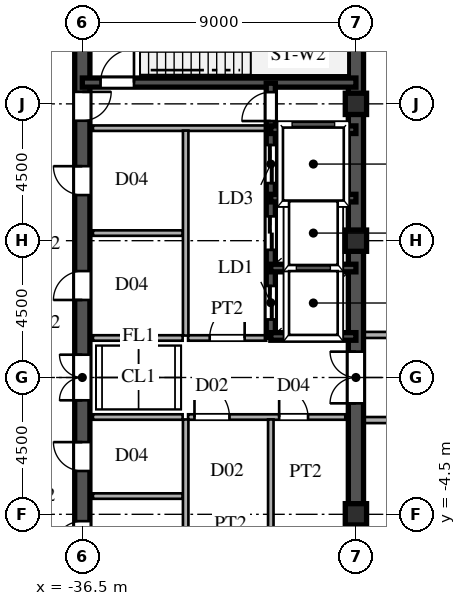
"""IFC4 building model, lengths in metres.
Left out: names, types, materials, properties, quantities, classifications, styles, units other than length and angle.
Written with IfcOpenShell. Run it as: python <this file> out.ifc"""

import sys

from ifc_helpers import new_model, si_unit, direction, frame, frame_2d, origin, origin_2d, place, context, subcontext, project, spatial, rectangle, hollow_rectangle, extrude, source, transform, mapped, element, fill, save


model = new_model("IFC4")
c1 = context("Model", 3, precision=1e-05, world=origin(), true_north=direction((0.0, 1.0)))
c2 = subcontext(c1, "Body", "Model", "MODEL_VIEW")
j1 = project(units=[si_unit("LENGTHUNIT", "METRE"), si_unit("PLANEANGLEUNIT", "RADIAN")], contexts=[c1])
p1 = place(None, origin())
s1 = spatial("IfcSite", under=j1, at=p1, CompositionType="ELEMENT")
p2 = place(p1, origin())
s2 = spatial("IfcBuilding", under=s1, at=p2, CompositionType="ELEMENT")
p3 = place(p2, frame((0.0, 0.0, 269.4)))
s3 = spatial("IfcBuildingStorey", under=s2, at=p3, CompositionType="ELEMENT", Elevation=269.4)
m1 = source(origin(), c2, "Body", "SweptSolid", [
    extrude(hollow_rectangle(XDim=0.7, YDim=0.7, WallThickness=0.03, at=origin_2d()), origin(), (0.0, 0.0, 1.0), 4.8),
])
for number, where, z_axis, x_axis in (
    (1, (-27.5, -4.5, 0.0), (0.0, 0.0, 1.0), (1.0, 0.0, 0.0)),
    (2, (-27.5, 4.5, 0.0), (0.0, 0.0, 1.0), (1.0, 0.0, 0.0)),
    (3, (-27.5, 9.0, 0.0), (0.0, 0.0, 1.0), (1.0, 0.0, 0.0)),
):
    element("IfcColumn", number, at=place(p3, frame(where, z_axis=z_axis, x_axis=x_axis)), inside=s3, PredefinedType="COLUMN", context=c2, shape_type="MappedRepresentation", body=[
        mapped(m1, transform((0.0, 0.0, 0.0), scale=1.0)),
    ])
for number, where, z_axis, x_axis in (
    (4, (-27.5, -13.5, 0.0), (0.0, 0.0, 1.0), (0.0, 1.0, 0.0)),
    (5, (-27.5, 1.3, 0.0), (0.0, 0.0, 1.0), (0.0, 1.0, 0.0)),
):
    element("IfcWall", number, at=place(p3, frame(where, z_axis=z_axis, x_axis=x_axis)), inside=s3, PredefinedType="SHEAR", context=c2, shape_type="SweptSolid", body=[
        extrude(rectangle(XDim=12.2, YDim=0.5, at=frame_2d((6.1, 0.0))), origin(), (0.0, 0.0, 1.0), 4.54),
    ])
p4 = place(p3, frame((-27.5, -1.3, 0.0), z_axis=(0.0, 0.0, 1.0), x_axis=(0.0, 1.0, 0.0)))
e6 = element("IfcWall", 6, at=p4, inside=s3, PredefinedType="SHEAR", context=c2, shape_type="SweptSolid", body=[
    extrude(rectangle(XDim=2.6, YDim=0.5, at=frame_2d((1.3, 0.0))), origin(), (0.0, 0.0, 1.0), 4.54),
])
p5 = place(p4, frame((0.45, 0.0, 0.0)))
e7 = element("IfcOpeningElement", 7, at=p5, cuts=e6, PredefinedType="OPENING", context=c2, shape_type="SweptSolid", body=[
    extrude(rectangle(XDim=1.7, YDim=2.35, at=frame_2d((0.85, 1.175))), frame((0.0, 0.26, 0.0), z_axis=(0.0, -1.0, 0.0), x_axis=(1.0, 0.0, 0.0)), (0.0, 0.0, 1.0), 0.52),
])
p6 = place(p3, frame((-36.5, -1.3, 0.0), z_axis=(0.0, 0.0, 1.0), x_axis=(0.0, 1.0, 0.0)))
e8 = element("IfcWall", 8, at=p6, inside=s3, PredefinedType="SHEAR", context=c2, shape_type="SweptSolid", body=[
    extrude(rectangle(XDim=2.6, YDim=0.5, at=frame_2d((1.3, 0.0))), origin(), (0.0, 0.0, 1.0), 4.54),
])
p7 = place(p6, frame((0.55, 0.0, 0.0)))
e9 = element("IfcOpeningElement", 9, at=p7, cuts=e8, PredefinedType="OPENING", context=c2, shape_type="SweptSolid", body=[
    extrude(rectangle(XDim=1.5, YDim=2.3, at=frame_2d((0.75, 1.15))), frame((0.0, 0.26, 0.0), z_axis=(0.0, -1.0, 0.0), x_axis=(1.0, 0.0, 0.0)), (0.0, 0.0, 1.0), 0.52),
])
p8 = place(p3, frame((-36.5, 8.2, 0.0), z_axis=(0.0, 0.0, 1.0), x_axis=(0.0, 1.0, 0.0)))
e10 = element("IfcWall", 10, at=p8, inside=s3, PredefinedType="SHEAR", context=c2, shape_type="SweptSolid", body=[
    extrude(rectangle(XDim=5.45, YDim=0.5, at=frame_2d((2.725, 0.0))), origin(), (0.0, 0.0, 1.0), 4.54),
])
p9 = place(p8, frame((0.245, 0.0, 0.0)))
e11 = element("IfcOpeningElement", 11, at=p9, cuts=e10, PredefinedType="OPENING", context=c2, shape_type="SweptSolid", body=[
    extrude(rectangle(XDim=0.95, YDim=2.15, at=frame_2d((0.475, 1.075))), frame((0.0, 0.26, 0.0), z_axis=(0.0, -1.0, 0.0), x_axis=(1.0, 0.0, 0.0)), (0.0, 0.0, 1.0), 0.52),
])
p10 = place(p3, frame((-36.5, -6.5, 0.0), z_axis=(0.0, 0.0, 1.0), x_axis=(0.0, 1.0, 0.0)))
e12 = element("IfcWall", 12, at=p10, inside=s3, PredefinedType="SHEAR", context=c2, shape_type="SweptSolid", body=[
    extrude(rectangle(XDim=2.6, YDim=0.5, at=frame_2d((1.3, 0.0))), origin(), (0.0, 0.0, 1.0), 4.54),
])
p11 = place(p10, frame((0.825, 0.0, 0.0)))
e13 = element("IfcOpeningElement", 13, at=p11, cuts=e12, PredefinedType="OPENING", context=c2, shape_type="SweptSolid", body=[
    extrude(rectangle(XDim=0.95, YDim=2.15, at=frame_2d((0.475, 1.075))), frame((0.0, 0.26, 0.0), z_axis=(0.0, -1.0, 0.0), x_axis=(1.0, 0.0, 0.0)), (0.0, 0.0, 1.0), 0.52),
])
p12 = place(p3, frame((-36.5, -3.9, 0.0), z_axis=(0.0, 0.0, 1.0), x_axis=(0.0, 1.0, 0.0)))
e14 = element("IfcWall", 14, at=p12, inside=s3, PredefinedType="SHEAR", context=c2, shape_type="SweptSolid", body=[
    extrude(rectangle(XDim=2.6, YDim=0.5, at=frame_2d((1.3, 0.0))), origin(), (0.0, 0.0, 1.0), 4.54),
])
p13 = place(p12, frame((0.825, 0.0, 0.0)))
e15 = element("IfcOpeningElement", 15, at=p13, cuts=e14, PredefinedType="OPENING", context=c2, shape_type="SweptSolid", body=[
    extrude(rectangle(XDim=0.95, YDim=2.15, at=frame_2d((0.475, 1.075))), frame((0.0, 0.26, 0.0), z_axis=(0.0, -1.0, 0.0), x_axis=(1.0, 0.0, 0.0)), (0.0, 0.0, 1.0), 0.52),
])
p14 = place(p3, frame((-36.5, 1.3, 0.0), z_axis=(0.0, 0.0, 1.0), x_axis=(0.0, 1.0, 0.0)))
e16 = element("IfcWall", 16, at=p14, inside=s3, PredefinedType="SHEAR", context=c2, shape_type="SweptSolid", body=[
    extrude(rectangle(XDim=3.45, YDim=0.5, at=frame_2d((1.725, 0.0))), origin(), (0.0, 0.0, 1.0), 4.54),
])
p15 = place(p14, frame((1.25, 0.0, 0.0)))
e17 = element("IfcOpeningElement", 17, at=p15, cuts=e16, PredefinedType="OPENING", context=c2, shape_type="SweptSolid", body=[
    extrude(rectangle(XDim=0.95, YDim=2.15, at=frame_2d((0.475, 1.075))), frame((0.0, 0.26, 0.0), z_axis=(0.0, -1.0, 0.0), x_axis=(1.0, 0.0, 0.0)), (0.0, 0.0, 1.0), 0.52),
])
p16 = place(p3, frame((-36.5, 4.75, 0.0), z_axis=(0.0, 0.0, 1.0), x_axis=(0.0, 1.0, 0.0)))
e18 = element("IfcWall", 18, at=p16, inside=s3, PredefinedType="SHEAR", context=c2, shape_type="SweptSolid", body=[
    extrude(rectangle(XDim=3.45, YDim=0.5, at=frame_2d((1.725, 0.0))), origin(), (0.0, 0.0, 1.0), 4.54),
])
p17 = place(p16, frame((1.25, 0.0, 0.0)))
e19 = element("IfcOpeningElement", 19, at=p17, cuts=e18, PredefinedType="OPENING", context=c2, shape_type="SweptSolid", body=[
    extrude(rectangle(XDim=0.95, YDim=2.15, at=frame_2d((0.475, 1.075))), frame((0.0, 0.26, 0.0), z_axis=(0.0, -1.0, 0.0), x_axis=(1.0, 0.0, 0.0)), (0.0, 0.0, 1.0), 0.52),
])
p18 = place(p3, frame((-36.5, 9.7, 0.0), z_axis=(0.0, 0.0, 1.0), x_axis=(1.0, 0.0, 0.0)))
e20 = element("IfcWall", 20, at=p18, inside=s3, PredefinedType="SHEAR", context=c2, shape_type="SweptSolid", body=[
    extrude(rectangle(XDim=9.0, YDim=0.3, at=frame_2d((4.5, 0.0))), origin(), (0.0, 0.0, 1.0), 4.54),
])
p19 = place(p18, frame((0.6, 0.0, 0.0)))
e21 = element("IfcOpeningElement", 21, at=p19, cuts=e20, PredefinedType="OPENING", context=c2, shape_type="SweptSolid", body=[
    extrude(rectangle(XDim=1.1, YDim=2.2, at=frame_2d((0.55, 1.1))), frame((0.0, 0.16, 0.0), z_axis=(0.0, -1.0, 0.0), x_axis=(1.0, 0.0, 0.0)), (0.0, 0.0, 1.0), 0.32),
])
for number, where, z_axis, x_axis in (
    (22, (-30.3, 1.35, 0.0), (0.0, 0.0, 1.0), (1.0, 0.0, 0.0)),
    (23, (-30.3, 3.6, 0.0), (0.0, 0.0, 1.0), (1.0, 0.0, 0.0)),
    (24, (-30.3, 5.9, 0.0), (0.0, 0.0, 1.0), (1.0, 0.0, 0.0)),
    (25, (-30.3, 8.15, 0.0), (0.0, 0.0, 1.0), (1.0, 0.0, 0.0)),
):
    element("IfcWall", number, at=place(p3, frame(where, z_axis=z_axis, x_axis=x_axis)), inside=s3, PredefinedType="SHEAR", context=c2, shape_type="SweptSolid", body=[
        extrude(rectangle(XDim=2.8, YDim=0.25, at=frame_2d((1.4, 0.0))), origin(), (0.0, 0.0, 1.0), 4.54),
    ])
p20 = place(p3, frame((-30.3, 1.32, 0.0), z_axis=(0.0, 0.0, 1.0), x_axis=(0.0, 1.0, 0.0)))
e26 = element("IfcWall", 26, at=p20, inside=s3, PredefinedType="SHEAR", context=c2, shape_type="SweptSolid", body=[
    extrude(rectangle(XDim=2.28, YDim=0.3, at=frame_2d((1.14, 0.0))), origin(), (0.0, 0.0, 1.0), 4.54),
])
p21 = place(p20, frame((0.59, 0.0, 0.0)))
e27 = element("IfcOpeningElement", 27, at=p21, cuts=e26, PredefinedType="OPENING", context=c2, shape_type="SweptSolid", body=[
    extrude(rectangle(XDim=1.1, YDim=2.2, at=frame_2d((0.55, 1.1))), frame((0.0, 0.16, 0.0), z_axis=(0.0, -1.0, 0.0), x_axis=(1.0, 0.0, 0.0)), (0.0, 0.0, 1.0), 0.32),
])
p22 = place(p3, frame((-30.3, 3.6, 0.0), z_axis=(0.0, 0.0, 1.0), x_axis=(0.0, 1.0, 0.0)))
e28 = element("IfcWall", 28, at=p22, inside=s3, PredefinedType="SHEAR", context=c2, shape_type="SweptSolid", body=[
    extrude(rectangle(XDim=2.3, YDim=0.3, at=frame_2d((1.15, 0.0))), origin(), (0.0, 0.0, 1.0), 4.54),
])
p23 = place(p22, frame((0.6, 0.0, 0.0)))
e29 = element("IfcOpeningElement", 29, at=p23, cuts=e28, PredefinedType="OPENING", context=c2, shape_type="SweptSolid", body=[
    extrude(rectangle(XDim=1.1, YDim=2.2, at=frame_2d((0.55, 1.1))), frame((0.0, 0.16, 0.0), z_axis=(0.0, -1.0, 0.0), x_axis=(1.0, 0.0, 0.0)), (0.0, 0.0, 1.0), 0.32),
])
p24 = place(p3, frame((-30.3, 5.9, 0.0), z_axis=(0.0, 0.0, 1.0), x_axis=(0.0, 1.0, 0.0)))
e30 = element("IfcWall", 30, at=p24, inside=s3, PredefinedType="SHEAR", context=c2, shape_type="SweptSolid", body=[
    extrude(rectangle(XDim=2.25, YDim=0.3, at=frame_2d((1.125, 0.0))), origin(), (0.0, 0.0, 1.0), 4.54),
])
p25 = place(p24, frame((0.495, 0.0, 0.0)))
e31 = element("IfcOpeningElement", 31, at=p25, cuts=e30, PredefinedType="OPENING", context=c2, shape_type="SweptSolid", body=[
    extrude(rectangle(XDim=1.25, YDim=2.3, at=frame_2d((0.625, 1.15))), frame((0.0, 0.16, 0.0), z_axis=(0.0, -1.0, 0.0), x_axis=(1.0, 0.0, 0.0)), (0.0, 0.0, 1.0), 0.32),
])
p26 = place(p3, frame((-30.3, 8.15, 0.0), z_axis=(0.0, 0.0, 1.0), x_axis=(0.0, 1.0, 0.0)))
e32 = element("IfcWall", 32, at=p26, inside=s3, PredefinedType="SHEAR", context=c2, shape_type="SweptSolid", body=[
    extrude(rectangle(XDim=1.53, YDim=0.3, at=frame_2d((0.765, 0.0))), origin(), (0.0, 0.0, 1.0), 4.54),
])
p27 = place(p26, frame((0.285, 0.0, 0.0)))
e33 = element("IfcOpeningElement", 33, at=p27, cuts=e32, PredefinedType="OPENING", context=c2, shape_type="SweptSolid", body=[
    extrude(rectangle(XDim=0.95, YDim=2.15, at=frame_2d((0.475, 1.075))), frame((0.0, 0.16, 0.0), z_axis=(0.0, -1.0, 0.0), x_axis=(1.0, 0.0, 0.0)), (0.0, 0.0, 1.0), 0.32),
])
p28 = place(p3, frame((-36.15, 8.2, 0.0), z_axis=(0.0, 0.0, 1.0), x_axis=(1.0, 0.0, 0.0)))
e34 = element("IfcWall", 34, at=p28, inside=s3, PredefinedType="PARTITIONING", context=c2, shape_type="SweptSolid", body=[
    extrude(rectangle(XDim=5.7, YDim=0.18, at=frame_2d((2.85, 0.0))), origin(), (0.0, 0.0, 1.0), 4.54),
])
p29 = place(p3, frame((-33.1, -6.42, 0.0), z_axis=(0.0, 0.0, 1.0), x_axis=(0.0, 1.0, 0.0)))
e35 = element("IfcWall", 35, at=p29, inside=s3, PredefinedType="PARTITIONING", context=c2, shape_type="SweptSolid", body=[
    extrude(rectangle(XDim=5.04, YDim=0.18, at=frame_2d((2.52, 0.0))), origin(), (0.0, 0.0, 1.0), 4.54),
])
p30 = place(p3, frame((-33.1, 1.38, 0.0), z_axis=(0.0, 0.0, 1.0), x_axis=(0.0, 1.0, 0.0)))
e36 = element("IfcWall", 36, at=p30, inside=s3, PredefinedType="PARTITIONING", context=c2, shape_type="SweptSolid", body=[
    extrude(rectangle(XDim=6.74, YDim=0.18, at=frame_2d((3.37, 0.0))), origin(), (0.0, 0.0, 1.0), 4.54),
])
p31 = place(p3, frame((-30.3, -1.3, 0.0), z_axis=(0.0, 0.0, 1.0), x_axis=(1.0, 0.0, 0.0)))
e37 = element("IfcWall", 37, at=p31, inside=s3, PredefinedType="PARTITIONING", context=c2, shape_type="SweptSolid", body=[
    extrude(rectangle(XDim=2.45, YDim=0.18, at=frame_2d((1.225, 0.0))), origin(), (0.0, 0.0, 1.0), 4.54),
])
p32 = place(p31, frame((0.275, 0.0, 0.0)))
e38 = element("IfcOpeningElement", 38, at=p32, cuts=e37, PredefinedType="OPENING", context=c2, shape_type="SweptSolid", body=[
    extrude(rectangle(XDim=0.95, YDim=2.15, at=frame_2d((0.475, 1.075))), frame((0.0, 0.1, 0.0), z_axis=(0.0, -1.0, 0.0), x_axis=(1.0, 0.0, 0.0)), (0.0, 0.0, 1.0), 0.2),
])
p33 = place(p3, frame((-33.02, -1.3, 0.0), z_axis=(0.0, 0.0, 1.0), x_axis=(1.0, 0.0, 0.0)))
e39 = element("IfcWall", 39, at=p33, inside=s3, PredefinedType="PARTITIONING", context=c2, shape_type="SweptSolid", body=[
    extrude(rectangle(XDim=2.72, YDim=0.18, at=frame_2d((1.36, 0.0))), origin(), (0.0, 0.0, 1.0), 4.54),
])
p34 = place(p33, frame((0.21, 0.0, 0.0)))
e40 = element("IfcOpeningElement", 40, at=p34, cuts=e39, PredefinedType="OPENING", context=c2, shape_type="SweptSolid", body=[
    extrude(rectangle(XDim=1.15, YDim=2.2, at=frame_2d((0.575, 1.1))), frame((0.0, 0.1, 0.0), z_axis=(0.0, -1.0, 0.0), x_axis=(1.0, 0.0, 0.0)), (0.0, 0.0, 1.0), 0.2),
])
p35 = place(p3, frame((-30.3, -7.12, 0.0), z_axis=(0.0, 0.0, 1.0), x_axis=(0.0, 1.0, 0.0)))
e41 = element("IfcWall", 41, at=p35, inside=s3, PredefinedType="PARTITIONING", context=c2, shape_type="SweptSolid", body=[
    extrude(rectangle(XDim=5.74, YDim=0.18, at=frame_2d((2.87, 0.0))), origin(), (0.0, 0.0, 1.0), 4.54),
])
p36 = place(p3, frame((-33.02, 1.3, 0.0), z_axis=(0.0, 0.0, 1.0), x_axis=(1.0, 0.0, 0.0)))
e42 = element("IfcWall", 42, at=p36, inside=s3, PredefinedType="PARTITIONING", context=c2, shape_type="SweptSolid", body=[
    extrude(rectangle(XDim=2.57, YDim=0.18, at=frame_2d((1.285, 0.0))), origin(), (0.0, 0.0, 1.0), 4.54),
])
p37 = place(p36, frame((0.71, 0.0, 0.0)))
e43 = element("IfcOpeningElement", 43, at=p37, cuts=e42, PredefinedType="OPENING", context=c2, shape_type="SweptSolid", body=[
    extrude(rectangle(XDim=1.15, YDim=2.2, at=frame_2d((0.575, 1.1))), frame((0.0, 0.1, 0.0), z_axis=(0.0, -1.0, 0.0), x_axis=(1.0, 0.0, 0.0)), (0.0, 0.0, 1.0), 0.2),
])
for number, where, z_axis, x_axis in (
    (44, (-36.15, -1.3, 0.0), (0.0, 0.0, 1.0), (1.0, 0.0, 0.0)),
    (45, (-36.15, 1.3, 0.0), (0.0, 0.0, 1.0), (1.0, 0.0, 0.0)),
    (46, (-36.15, -3.9, 0.0), (0.0, 0.0, 1.0), (1.0, 0.0, 0.0)),
    (47, (-36.15, 4.75, 0.0), (0.0, 0.0, 1.0), (1.0, 0.0, 0.0)),
):
    element("IfcWall", number, at=place(p3, frame(where, z_axis=z_axis, x_axis=x_axis)), inside=s3, PredefinedType="PARTITIONING", context=c2, shape_type="SweptSolid", body=[
        extrude(rectangle(XDim=2.95, YDim=0.18, at=frame_2d((1.475, 0.0))), origin(), (0.0, 0.0, 1.0), 4.54),
    ])
p38 = place(p3, frame((-27.245, -1.4, 0.0), z_axis=(0.0, 0.0, 1.0), x_axis=(1.0, 0.0, 0.0)))
e48 = element("IfcWall", 48, at=p38, inside=s3, PredefinedType="PARTITIONING", context=c2, shape_type="SweptSolid", body=[
    extrude(rectangle(XDim=54.49, YDim=0.2, at=frame_2d((27.245, 0.0))), origin(), (0.0, 0.0, 1.0), 4.54),
])
p39 = place(p38, frame((17.67, 0.0, 0.0)))
e49 = element("IfcOpeningElement", 49, at=p39, cuts=e48, PredefinedType="OPENING", context=c2, shape_type="SweptSolid", body=[
    extrude(rectangle(XDim=1.15, YDim=2.2, at=frame_2d((0.575, 1.1))), frame((0.0, 0.11, 0.0), z_axis=(0.0, -1.0, 0.0), x_axis=(1.0, 0.0, 0.0)), (0.0, 0.0, 1.0), 0.22),
])
p40 = place(p38, frame((35.17, 0.0, 0.0)))
e50 = element("IfcOpeningElement", 50, at=p40, cuts=e48, PredefinedType="OPENING", context=c2, shape_type="SweptSolid", body=[
    extrude(rectangle(XDim=1.15, YDim=2.2, at=frame_2d((0.575, 1.1))), frame((0.0, 0.11, 0.0), z_axis=(0.0, -1.0, 0.0), x_axis=(1.0, 0.0, 0.0)), (0.0, 0.0, 1.0), 0.22),
])
p41 = place(p3, frame((-27.245, 1.4, 0.0), z_axis=(0.0, 0.0, 1.0), x_axis=(1.0, 0.0, 0.0)))
e51 = element("IfcWall", 51, at=p41, inside=s3, PredefinedType="PARTITIONING", context=c2, shape_type="SweptSolid", body=[
    extrude(rectangle(XDim=54.49, YDim=0.2, at=frame_2d((27.245, 0.0))), origin(), (0.0, 0.0, 1.0), 4.54),
])
p42 = place(p41, frame((17.67, 0.0, 0.0)))
e52 = element("IfcOpeningElement", 52, at=p42, cuts=e51, PredefinedType="OPENING", context=c2, shape_type="SweptSolid", body=[
    extrude(rectangle(XDim=1.15, YDim=2.2, at=frame_2d((0.575, 1.1))), frame((0.0, 0.11, 0.0), z_axis=(0.0, -1.0, 0.0), x_axis=(1.0, 0.0, 0.0)), (0.0, 0.0, 1.0), 0.22),
])
p43 = place(p41, frame((46.055, 0.0, 0.0)))
e53 = element("IfcOpeningElement", 53, at=p43, cuts=e51, PredefinedType="OPENING", context=c2, shape_type="SweptSolid", body=[
    extrude(rectangle(XDim=0.88, YDim=2.1, at=frame_2d((0.44, 1.05))), frame((0.0, 0.11, 0.0), z_axis=(0.0, -1.0, 0.0), x_axis=(1.0, 0.0, 0.0)), (0.0, 0.0, 1.0), 0.22),
])
p44 = place(p41, frame((51.405, 0.0, 0.0)))
e54 = element("IfcOpeningElement", 54, at=p44, cuts=e51, PredefinedType="OPENING", context=c2, shape_type="SweptSolid", body=[
    extrude(rectangle(XDim=0.88, YDim=2.1, at=frame_2d((0.44, 1.05))), frame((0.0, 0.11, 0.0), z_axis=(0.0, -1.0, 0.0), x_axis=(1.0, 0.0, 0.0)), (0.0, 0.0, 1.0), 0.22),
])
m2 = source(origin(), c2, "Body", "SweptSolid", [
    extrude(rectangle(XDim=1.7, YDim=2.35, at=frame_2d((0.85, 1.175))), frame((0.0, 0.025, 0.0), z_axis=(0.0, -1.0, 0.0), x_axis=(1.0, 0.0, 0.0)), (0.0, 0.0, 1.0), 0.05),
])
p45 = place(p5, origin())
e55 = element("IfcDoor", 55, at=p45, inside=s3, OperationType="DOUBLE_SWING_LEFT", PredefinedType="DOOR", context=c2, shape_type="MappedRepresentation", body=[
    mapped(m2, transform((0.0, 0.0, 0.0), scale=1.0)),
])
fill(e7, e55)
m3 = source(origin(), c2, "Body", "SweptSolid", [
    extrude(rectangle(XDim=1.5, YDim=2.3, at=frame_2d((0.75, 1.15))), frame((0.0, 0.025, 0.0), z_axis=(0.0, -1.0, 0.0), x_axis=(1.0, 0.0, 0.0)), (0.0, 0.0, 1.0), 0.05),
])
p46 = place(p7, origin())
e56 = element("IfcDoor", 56, at=p46, inside=s3, OperationType="DOUBLE_SWING_LEFT", PredefinedType="DOOR", context=c2, shape_type="MappedRepresentation", body=[
    mapped(m3, transform((0.0, 0.0, 0.0), scale=1.0)),
])
fill(e9, e56)
m4 = source(origin(), c2, "Body", "SweptSolid", [
    extrude(rectangle(XDim=0.95, YDim=2.15, at=frame_2d((0.475, 1.075))), frame((0.0, 0.025, 0.0), z_axis=(0.0, -1.0, 0.0), x_axis=(1.0, 0.0, 0.0)), (0.0, 0.0, 1.0), 0.05),
])
p47 = place(p9, frame((0.95, 0.0, 0.0), z_axis=(0.0, 0.0, 1.0), x_axis=(-1.0, 0.0, 0.0)))
e57 = element("IfcDoor", 57, at=p47, inside=s3, OperationType="SINGLE_SWING_RIGHT", PredefinedType="DOOR", context=c2, shape_type="MappedRepresentation", body=[
    mapped(m4, transform((0.0, 0.0, 0.0), scale=1.0)),
])
fill(e11, e57)
p48 = place(p11, origin())
e58 = element("IfcDoor", 58, at=p48, inside=s3, OperationType="SINGLE_SWING_LEFT", PredefinedType="DOOR", context=c2, shape_type="MappedRepresentation", body=[
    mapped(m4, transform((0.0, 0.0, 0.0), scale=1.0)),
])
fill(e13, e58)
p49 = place(p13, origin())
e59 = element("IfcDoor", 59, at=p49, inside=s3, OperationType="SINGLE_SWING_RIGHT", PredefinedType="DOOR", context=c2, shape_type="MappedRepresentation", body=[
    mapped(m4, transform((0.0, 0.0, 0.0), scale=1.0)),
])
fill(e15, e59)
p50 = place(p15, origin())
e60 = element("IfcDoor", 60, at=p50, inside=s3, OperationType="SINGLE_SWING_LEFT", PredefinedType="DOOR", context=c2, shape_type="MappedRepresentation", body=[
    mapped(m4, transform((0.0, 0.0, 0.0), scale=1.0)),
])
fill(e17, e60)
p51 = place(p17, origin())
e61 = element("IfcDoor", 61, at=p51, inside=s3, OperationType="SINGLE_SWING_RIGHT", PredefinedType="DOOR", context=c2, shape_type="MappedRepresentation", body=[
    mapped(m4, transform((0.0, 0.0, 0.0), scale=1.0)),
])
fill(e19, e61)
m5 = source(origin(), c2, "Body", "SweptSolid", [
    extrude(rectangle(XDim=1.1, YDim=2.2, at=frame_2d((0.55, 1.1))), frame((0.0, 0.025, 0.0), z_axis=(0.0, -1.0, 0.0), x_axis=(1.0, 0.0, 0.0)), (0.0, 0.0, 1.0), 0.05),
])
p52 = place(p19, origin())
e62 = element("IfcDoor", 62, at=p52, inside=s3, OperationType="SINGLE_SWING_RIGHT", PredefinedType="DOOR", context=c2, shape_type="MappedRepresentation", body=[
    mapped(m5, transform((0.0, 0.0, 0.0), scale=1.0)),
])
fill(e21, e62)
m6 = source(origin(), c2, "Body", "SweptSolid", [
    extrude(rectangle(XDim=1.1, YDim=2.2, at=frame_2d((0.55, 1.1))), frame((0.0, 0.025, 0.0), z_axis=(0.0, -1.0, 0.0), x_axis=(1.0, 0.0, 0.0)), (0.0, 0.0, 1.0), 0.05),
])
p53 = place(p21, origin())
e63 = element("IfcDoor", 63, at=p53, inside=s3, OperationType="DOUBLE_DOOR_SLIDING", PredefinedType="DOOR", context=c2, shape_type="MappedRepresentation", body=[
    mapped(m6, transform((0.0, 0.0, 0.0), scale=1.0)),
])
fill(e27, e63)
p54 = place(p23, origin())
e64 = element("IfcDoor", 64, at=p54, inside=s3, OperationType="DOUBLE_DOOR_SLIDING", PredefinedType="DOOR", context=c2, shape_type="MappedRepresentation", body=[
    mapped(m6, transform((0.0, 0.0, 0.0), scale=1.0)),
])
fill(e29, e64)
m7 = source(origin(), c2, "Body", "SweptSolid", [
    extrude(rectangle(XDim=1.25, YDim=2.3, at=frame_2d((0.625, 1.15))), frame((0.0, 0.025, 0.0), z_axis=(0.0, -1.0, 0.0), x_axis=(1.0, 0.0, 0.0)), (0.0, 0.0, 1.0), 0.05),
])
p55 = place(p25, origin())
e65 = element("IfcDoor", 65, at=p55, inside=s3, OperationType="DOUBLE_DOOR_SLIDING", PredefinedType="DOOR", context=c2, shape_type="MappedRepresentation", body=[
    mapped(m7, transform((0.0, 0.0, 0.0), scale=1.0)),
])
fill(e31, e65)
p56 = place(p27, origin())
e66 = element("IfcDoor", 66, at=p56, inside=s3, OperationType="SINGLE_SWING_LEFT", PredefinedType="DOOR", context=c2, shape_type="MappedRepresentation", body=[
    mapped(m4, transform((0.0, 0.0, 0.0), scale=1.0)),
])
fill(e33, e66)
p57 = place(p32, origin())
e67 = element("IfcDoor", 67, at=p57, inside=s3, OperationType="SINGLE_SWING_LEFT", PredefinedType="DOOR", context=c2, shape_type="MappedRepresentation", body=[
    mapped(m4, transform((0.0, 0.0, 0.0), scale=1.0)),
])
fill(e38, e67)
m8 = source(origin(), c2, "Body", "SweptSolid", [
    extrude(rectangle(XDim=1.15, YDim=2.2, at=frame_2d((0.575, 1.1))), frame((0.0, 0.025, 0.0), z_axis=(0.0, -1.0, 0.0), x_axis=(1.0, 0.0, 0.0)), (0.0, 0.0, 1.0), 0.05),
])
p58 = place(p34, origin())
e68 = element("IfcDoor", 68, at=p58, inside=s3, OperationType="SINGLE_SWING_LEFT", PredefinedType="DOOR", context=c2, shape_type="MappedRepresentation", body=[
    mapped(m8, transform((0.0, 0.0, 0.0), scale=1.0)),
])
fill(e40, e68)
p59 = place(p37, origin())
e69 = element("IfcDoor", 69, at=p59, inside=s3, OperationType="SINGLE_SWING_RIGHT", PredefinedType="DOOR", context=c2, shape_type="MappedRepresentation", body=[
    mapped(m8, transform((0.0, 0.0, 0.0), scale=1.0)),
])
fill(e43, e69)
save(model, sys.argv[1])
